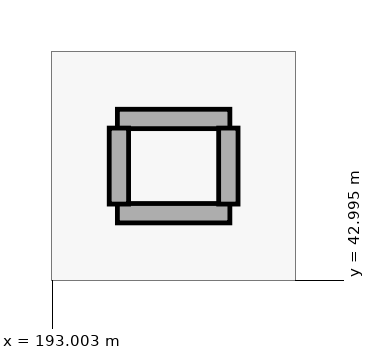
"""IFC4 building model, lengths in metres.
Left out: names, types, materials, properties, quantities, classifications, styles, units other than length and angle.
Written with IfcOpenShell. Run it as: python <this file> out.ifc"""

import sys

from ifc_helpers import new_model, si_unit, direction, frame, frame_2d, origin, place, context, subcontext, project, spatial, rectangle, extrude, element, save


model = new_model("IFC4")
c1 = context("Model", 3, precision=1e-05, world=origin(), true_north=direction((0.0, 1.0)))
c2 = subcontext(c1, "Body", "Model", "MODEL_VIEW")
j1 = project(units=[si_unit("LENGTHUNIT", "METRE"), si_unit("PLANEANGLEUNIT", "RADIAN")], contexts=[c1])
p1 = place(None, origin())
s1 = spatial("IfcSite", under=j1, at=p1, CompositionType="ELEMENT")
p2 = place(p1, origin())
s2 = spatial("IfcBuilding", under=s1, at=p2, CompositionType="ELEMENT")
p3 = place(p2, frame((0.0, 0.0, 15.6)))
s3 = spatial("IfcBuildingStorey", under=s2, at=p3, CompositionType="ELEMENT", Elevation=15.6)
for number, where, z_axis, x_axis in (
    (1, (193.86, 45.12, 0.0), (0.0, 0.0, 1.0), (1.0, 0.0, 0.0)),
    (2, (193.86, 43.88, 0.0), (0.0, 0.0, 1.0), (1.0, 0.0, 0.0)),
):
    element("IfcWall", number, at=place(p3, frame(where, z_axis=z_axis, x_axis=x_axis)), inside=s3, PredefinedType="PARTITIONING", context=c2, shape_type="SweptSolid", body=[
        extrude(rectangle(XDim=1.48, YDim=0.255, at=frame_2d((0.74, 0.0))), origin(), (0.0, 0.0, 1.0), 4.72),
    ])
for number, where, z_axis, x_axis in (
    (3, (193.88, 44.0, 0.0), (0.0, 0.0, 1.0), (0.0, 1.0, 0.0)),
    (4, (195.32, 44.0, 0.0), (0.0, 0.0, 1.0), (0.0, 1.0, 0.0)),
):
    element("IfcWall", number, at=place(p3, frame(where, z_axis=z_axis, x_axis=x_axis)), inside=s3, PredefinedType="PARTITIONING", context=c2, shape_type="SweptSolid", body=[
        extrude(rectangle(XDim=1.0, YDim=0.255, at=frame_2d((0.5, 0.0))), origin(), (0.0, 0.0, 1.0), 4.72),
    ])
save(model, sys.argv[1])
